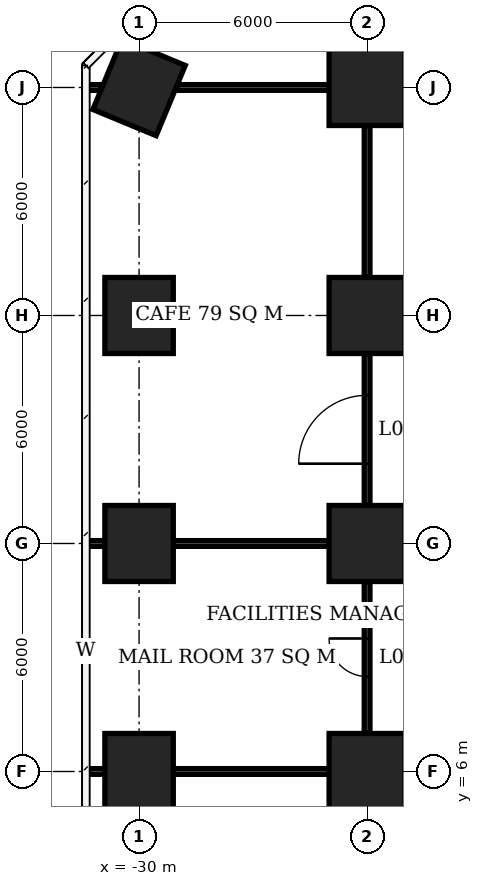
"""IFC4 building model, lengths in metres.
Left out: names, types, materials, properties, quantities, classifications, styles, units other than length and angle.
Written with IfcOpenShell. Run it as: python <this file> out.ifc"""

import sys

from ifc_helpers import new_model, si_unit, direction, frame, frame_2d, origin, origin_2d, place, context, subcontext, project, spatial, rectangle, extrude, element, fill, save


model = new_model("IFC4")
c1 = context("Model", 3, precision=1e-05, world=origin(), true_north=direction((0.0, 1.0)))
c2 = subcontext(c1, "Body", "Model", "MODEL_VIEW")
j1 = project(units=[si_unit("LENGTHUNIT", "METRE"), si_unit("PLANEANGLEUNIT", "RADIAN")], contexts=[c1])
p1 = place(None, origin())
s1 = spatial("IfcSite", under=j1, at=p1, CompositionType="ELEMENT")
p2 = place(p1, origin())
s2 = spatial("IfcBuilding", under=s1, at=p2, CompositionType="ELEMENT")
p3 = place(p2, origin())
s3 = spatial("IfcBuildingStorey", under=s2, at=p3, CompositionType="ELEMENT", Elevation=0.0)
for number, where, z_axis, x_axis in (
    (1, (-30.0, 6.0, -0.45), (0.0, 0.0, 1.0), (0.0, 1.0, 0.0)),
    (2, (-30.0, 12.0, -0.45), (0.0, 0.0, 1.0), (0.0, 1.0, 0.0)),
    (3, (-30.0, 18.0, -0.45), (0.0, 0.0, 1.0), (0.0, 1.0, 0.0)),
    (4, (-30.0, 24.0, -0.45), (0.0, 0.0, 1.0), (0.383, 0.924, 0.0)),
):
    element("IfcColumn", number, at=place(p3, frame(where, z_axis=z_axis, x_axis=x_axis)), inside=s3, PredefinedType="COLUMN", context=c2, shape_type="SweptSolid", body=[
        extrude(rectangle(XDim=2.0, YDim=1.8, at=origin_2d()), origin(), (0.0, 0.0, 1.0), 6.45),
    ])
for number, where, z_axis, x_axis in (
    (5, (-24.0, 6.0, -0.45), (0.0, 0.0, 1.0), (1.0, 0.0, 0.0)),
    (6, (-24.0, 12.0, -0.45), (0.0, 0.0, 1.0), (1.0, 0.0, 0.0)),
    (7, (-24.0, 18.0, -0.45), (0.0, 0.0, 1.0), (1.0, 0.0, 0.0)),
    (8, (-24.0, 24.0, -0.45), (0.0, 0.0, 1.0), (1.0, 0.0, 0.0)),
):
    element("IfcColumn", number, at=place(p3, frame(where, z_axis=z_axis, x_axis=x_axis)), inside=s3, PredefinedType="COLUMN", context=c2, shape_type="SweptSolid", body=[
        extrude(rectangle(XDim=2.0, YDim=2.0, at=origin_2d()), origin(), (0.0, 0.0, 1.0), 6.45),
    ])
p4 = place(p3, frame((-31.35, 6.0, 0.0), z_axis=(0.0, 0.0, 1.0), x_axis=(1.0, 0.0, 0.0)))
e9 = element("IfcWall", 9, at=p4, inside=s3, PredefinedType="PARTITIONING", context=c2, shape_type="SweptSolid", body=[
    extrude(rectangle(XDim=0.45, YDim=0.15, at=frame_2d((0.225, 0.0))), origin(), (0.0, 0.0, 1.0), 5.75),
])
p5 = place(p3, frame((-29.1, 6.0, 0.0), z_axis=(0.0, 0.0, 1.0), x_axis=(1.0, 0.0, 0.0)))
e10 = element("IfcWall", 10, at=p5, inside=s3, PredefinedType="PARTITIONING", context=c2, shape_type="SweptSolid", body=[
    extrude(rectangle(XDim=4.1, YDim=0.15, at=frame_2d((2.05, 0.0))), origin(), (0.0, 0.0, 1.0), 5.75),
])
p6 = place(p3, frame((-31.375, 12.0, 0.0), z_axis=(0.0, 0.0, 1.0), x_axis=(1.0, 0.0, 0.0)))
e11 = element("IfcWall", 11, at=p6, inside=s3, PredefinedType="PARTITIONING", context=c2, shape_type="SweptSolid", body=[
    extrude(rectangle(XDim=0.475, YDim=0.15, at=frame_2d((0.238, 0.0))), origin(), (0.0, 0.0, 1.0), 5.75),
])
p7 = place(p3, frame((-29.1, 12.0, 0.0), z_axis=(0.0, 0.0, 1.0), x_axis=(1.0, 0.0, 0.0)))
e12 = element("IfcWall", 12, at=p7, inside=s3, PredefinedType="PARTITIONING", context=c2, shape_type="SweptSolid", body=[
    extrude(rectangle(XDim=4.1, YDim=0.15, at=frame_2d((2.05, 0.0))), origin(), (0.0, 0.0, 1.0), 5.75),
])
p8 = place(p3, frame((-31.375, 24.0, 0.0), z_axis=(0.0, 0.0, 1.0), x_axis=(1.0, 0.0, 0.0)))
e13 = element("IfcWall", 13, at=p8, inside=s3, PredefinedType="PARTITIONING", context=c2, shape_type="SweptSolid", body=[
    extrude(rectangle(XDim=0.37, YDim=0.15, at=frame_2d((0.185, 0.0))), origin(), (0.0, 0.0, 1.0), 5.75),
])
p9 = place(p3, frame((-28.995, 24.0, 0.0), z_axis=(0.0, 0.0, 1.0), x_axis=(1.0, 0.0, 0.0)))
e14 = element("IfcWall", 14, at=p9, inside=s3, PredefinedType="PARTITIONING", context=c2, shape_type="SweptSolid", body=[
    extrude(rectangle(XDim=3.995, YDim=0.15, at=frame_2d((1.998, 0.0))), origin(), (0.0, 0.0, 1.0), 5.75),
])
p10 = place(p3, frame((-24.0, 7.0, 0.0), z_axis=(0.0, 0.0, 1.0), x_axis=(0.0, 1.0, 0.0)))
e15 = element("IfcWall", 15, at=p10, inside=s3, PredefinedType="PARTITIONING", context=c2, shape_type="SweptSolid", body=[
    extrude(rectangle(XDim=4.0, YDim=0.15, at=frame_2d((2.0, 0.0))), origin(), (0.0, 0.0, 1.0), 5.75),
])
p11 = place(p10, frame((1.5, 0.0, 0.0)))
e16 = element("IfcOpeningElement", 16, at=p11, cuts=e15, PredefinedType="OPENING", context=c2, shape_type="SweptSolid", body=[
    extrude(rectangle(XDim=1.0, YDim=2.1, at=frame_2d((0.5, 1.05))), frame((0.0, 0.085, 0.0), z_axis=(0.0, -1.0, 0.0), x_axis=(1.0, 0.0, 0.0)), (0.0, 0.0, 1.0), 0.17),
])
p12 = place(p3, frame((-24.0, 13.0, 0.0), z_axis=(0.0, 0.0, 1.0), x_axis=(0.0, 1.0, 0.0)))
e17 = element("IfcWall", 17, at=p12, inside=s3, PredefinedType="PARTITIONING", context=c2, shape_type="SweptSolid", body=[
    extrude(rectangle(XDim=4.0, YDim=0.15, at=frame_2d((2.0, 0.0))), origin(), (0.0, 0.0, 1.0), 5.75),
])
p13 = place(p12, frame((1.1, 0.0, 0.0)))
e18 = element("IfcOpeningElement", 18, at=p13, cuts=e17, PredefinedType="OPENING", context=c2, shape_type="SweptSolid", body=[
    extrude(rectangle(XDim=1.8, YDim=2.4, at=frame_2d((0.9, 1.2))), frame((0.0, 0.085, 0.0), z_axis=(0.0, -1.0, 0.0), x_axis=(1.0, 0.0, 0.0)), (0.0, 0.0, 1.0), 0.17),
])
p14 = place(p3, frame((-24.0, 19.0, 0.0), z_axis=(0.0, 0.0, 1.0), x_axis=(0.0, 1.0, 0.0)))
e19 = element("IfcWall", 19, at=p14, inside=s3, PredefinedType="PARTITIONING", context=c2, shape_type="SweptSolid", body=[
    extrude(rectangle(XDim=4.0, YDim=0.15, at=frame_2d((2.0, 0.0))), origin(), (0.0, 0.0, 1.0), 5.75),
])
p15 = place(p11, origin())
e20 = element("IfcDoor", 20, at=p15, inside=s3, OperationType="SINGLE_SWING_RIGHT", PredefinedType="DOOR", context=c2, shape_type="SweptSolid", body=[
    extrude(rectangle(XDim=1.0, YDim=2.1, at=frame_2d((0.5, 1.05))), frame((0.0, 0.025, 0.0), z_axis=(0.0, -1.0, 0.0), x_axis=(1.0, 0.0, 0.0)), (0.0, 0.0, 1.0), 0.05),
])
fill(e16, e20)
p16 = place(p13, origin())
e21 = element("IfcDoor", 21, at=p16, inside=s3, OperationType="DOUBLE_DOOR_SINGLE_SWING", PredefinedType="DOOR", context=c2, shape_type="SweptSolid", body=[
    extrude(rectangle(XDim=1.8, YDim=2.4, at=frame_2d((0.9, 1.2))), frame((0.0, 0.025, 0.0), z_axis=(0.0, -1.0, 0.0), x_axis=(1.0, 0.0, 0.0)), (0.0, 0.0, 1.0), 0.05),
])
fill(e18, e21)
save(model, sys.argv[1])
